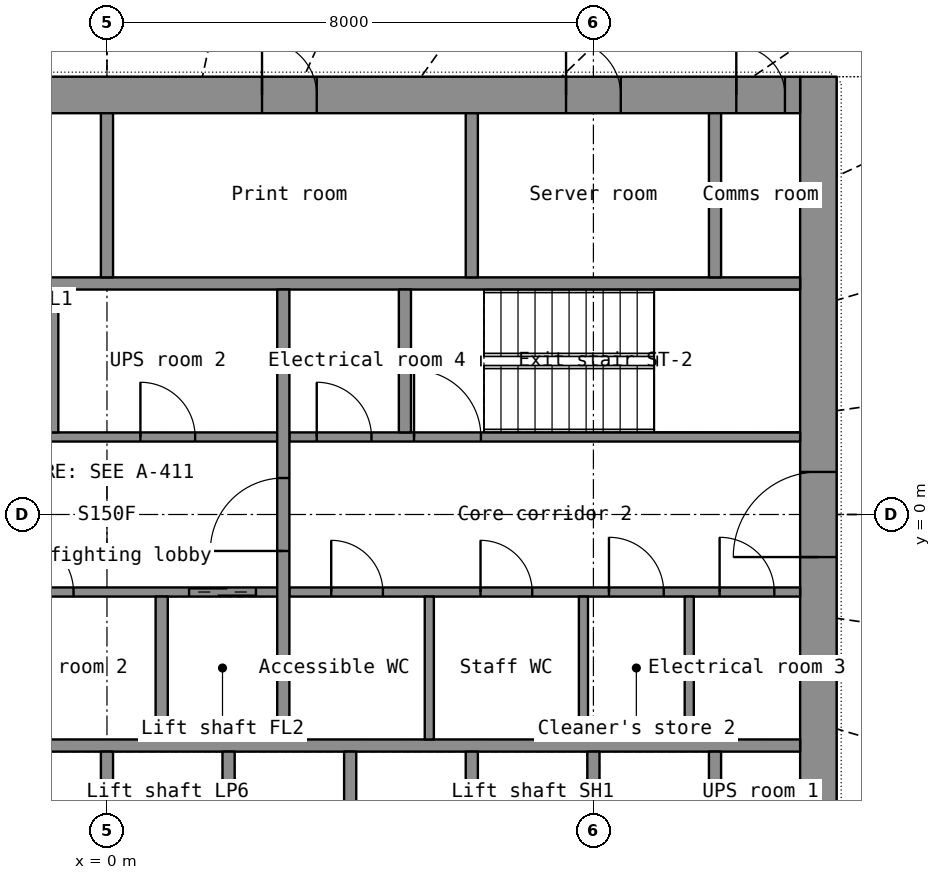
"""IFC4 building model, lengths in metres.
Left out: names, types, materials, properties, quantities, classifications, styles, units other than length and angle.
Written with IfcOpenShell. Run it as: python <this file> out.ifc"""

import sys

from ifc_helpers import new_model, si_unit, direction, frame, frame_2d, origin, place, context, subcontext, project, spatial, rectangle, extrude, element, fill, save


model = new_model("IFC4")
c1 = context("Model", 3, precision=1e-05, world=origin(), true_north=direction((0.0, 1.0)))
c2 = subcontext(c1, "Body", "Model", "MODEL_VIEW")
j1 = project(units=[si_unit("LENGTHUNIT", "METRE"), si_unit("PLANEANGLEUNIT", "RADIAN")], contexts=[c1])
p1 = place(None, origin())
s1 = spatial("IfcSite", under=j1, at=p1, CompositionType="ELEMENT")
p2 = place(p1, origin())
s2 = spatial("IfcBuilding", under=s1, at=p2, CompositionType="ELEMENT")
p3 = place(p2, frame((0.0, 0.0, 77.8)))
s3 = spatial("IfcBuildingStorey", under=s2, at=p3, CompositionType="ELEMENT", Elevation=77.8)
p4 = place(p3, frame((11.7, -7.2, 0.0), z_axis=(0.0, 0.0, 1.0), x_axis=(0.0, 1.0, 0.0)))
e1 = element("IfcWall", 1, at=p4, inside=s3, PredefinedType="SHEAR", context=c2, shape_type="SweptSolid", body=[
    extrude(rectangle(XDim=14.4, YDim=0.6, at=frame_2d((7.2, 0.0))), origin(), (0.0, 0.0, 1.0), 3.3),
])
p5 = place(p4, frame((6.5, 0.0, 0.0)))
e2 = element("IfcOpeningElement", 2, at=p5, cuts=e1, PredefinedType="OPENING", context=c2, shape_type="SweptSolid", body=[
    extrude(rectangle(XDim=1.4, YDim=2.2, at=frame_2d((0.7, 1.1))), frame((0.0, 0.31, 0.0), z_axis=(0.0, -1.0, 0.0), x_axis=(1.0, 0.0, 0.0)), (0.0, 0.0, 1.0), 0.62),
])
p6 = place(p3, frame((-11.4, 6.9, 0.0), z_axis=(0.0, 0.0, 1.0), x_axis=(1.0, 0.0, 0.0)))
e3 = element("IfcWall", 3, at=p6, inside=s3, PredefinedType="SHEAR", context=c2, shape_type="SweptSolid", body=[
    extrude(rectangle(XDim=22.8, YDim=0.6, at=frame_2d((11.4, 0.0))), origin(), (0.0, 0.0, 1.0), 3.3),
])
p7 = place(p6, frame((1.85, 0.0, 0.0)))
e4 = element("IfcOpeningElement", 4, at=p7, cuts=e3, PredefinedType="OPENING", context=c2, shape_type="SweptSolid", body=[
    extrude(rectangle(XDim=1.1, YDim=2.2, at=frame_2d((0.55, 1.1))), frame((0.0, 0.31, 0.0), z_axis=(0.0, -1.0, 0.0), x_axis=(1.0, 0.0, 0.0)), (0.0, 0.0, 1.0), 0.62),
])
p8 = place(p6, frame((7.95, 0.0, 0.0)))
e5 = element("IfcOpeningElement", 5, at=p8, cuts=e3, PredefinedType="OPENING", context=c2, shape_type="SweptSolid", body=[
    extrude(rectangle(XDim=0.9, YDim=2.1, at=frame_2d((0.45, 1.05))), frame((0.0, 0.31, 0.0), z_axis=(0.0, -1.0, 0.0), x_axis=(1.0, 0.0, 0.0)), (0.0, 0.0, 1.0), 0.62),
])
p9 = place(p6, frame((13.95, 0.0, 0.0)))
e6 = element("IfcOpeningElement", 6, at=p9, cuts=e3, PredefinedType="OPENING", context=c2, shape_type="SweptSolid", body=[
    extrude(rectangle(XDim=0.9, YDim=2.1, at=frame_2d((0.45, 1.05))), frame((0.0, 0.31, 0.0), z_axis=(0.0, -1.0, 0.0), x_axis=(1.0, 0.0, 0.0)), (0.0, 0.0, 1.0), 0.62),
])
p10 = place(p6, frame((18.95, 0.0, 0.0)))
e7 = element("IfcOpeningElement", 7, at=p10, cuts=e3, PredefinedType="OPENING", context=c2, shape_type="SweptSolid", body=[
    extrude(rectangle(XDim=0.9, YDim=2.1, at=frame_2d((0.45, 1.05))), frame((0.0, 0.31, 0.0), z_axis=(0.0, -1.0, 0.0), x_axis=(1.0, 0.0, 0.0)), (0.0, 0.0, 1.0), 0.62),
])
p11 = place(p6, frame((0.25, 0.0, 0.0)))
e8 = element("IfcOpeningElement", 8, at=p11, cuts=e3, PredefinedType="OPENING", context=c2, shape_type="SweptSolid", body=[
    extrude(rectangle(XDim=0.8, YDim=2.05, at=frame_2d((0.4, 1.025))), frame((0.0, 0.31, 0.0), z_axis=(0.0, -1.0, 0.0), x_axis=(1.0, 0.0, 0.0)), (0.0, 0.0, 1.0), 0.62),
])
p12 = place(p6, frame((21.75, 0.0, 0.0)))
e9 = element("IfcOpeningElement", 9, at=p12, cuts=e3, PredefinedType="OPENING", context=c2, shape_type="SweptSolid", body=[
    extrude(rectangle(XDim=0.8, YDim=2.05, at=frame_2d((0.4, 1.025))), frame((0.0, 0.31, 0.0), z_axis=(0.0, -1.0, 0.0), x_axis=(1.0, 0.0, 0.0)), (0.0, 0.0, 1.0), 0.62),
])
for number, where, z_axis, x_axis in (
    (10, (-11.4, -3.8, 0.0), (0.0, 0.0, 1.0), (1.0, 0.0, 0.0)),
    (11, (-11.4, 3.8, 0.0), (0.0, 0.0, 1.0), (1.0, 0.0, 0.0)),
):
    element("IfcWall", number, at=place(p3, frame(where, z_axis=z_axis, x_axis=x_axis)), inside=s3, PredefinedType="SHEAR", context=c2, shape_type="SweptSolid", body=[
        extrude(rectangle(XDim=22.8, YDim=0.2, at=frame_2d((11.4, 0.0))), origin(), (0.0, 0.0, 1.0), 3.3),
    ])
for number, where, z_axis, x_axis in (
    (12, (0.0, -6.6, 0.0), (0.0, 0.0, 1.0), (0.0, 1.0, 0.0)),
    (13, (2.0, -6.6, 0.0), (0.0, 0.0, 1.0), (0.0, 1.0, 0.0)),
    (14, (4.0, -6.6, 0.0), (0.0, 0.0, 1.0), (0.0, 1.0, 0.0)),
    (15, (6.0, -6.6, 0.0), (0.0, 0.0, 1.0), (0.0, 1.0, 0.0)),
    (16, (8.0, -6.6, 0.0), (0.0, 0.0, 1.0), (0.0, 1.0, 0.0)),
    (17, (10.0, -6.6, 0.0), (0.0, 0.0, 1.0), (0.0, 1.0, 0.0)),
    (18, (10.0, 3.9, 0.0), (0.0, 0.0, 1.0), (0.0, 1.0, 0.0)),
):
    element("IfcWall", number, at=place(p3, frame(where, z_axis=z_axis, x_axis=x_axis)), inside=s3, PredefinedType="SHEAR", context=c2, shape_type="SweptSolid", body=[
        extrude(rectangle(XDim=2.7, YDim=0.2, at=frame_2d((1.35, 0.0))), origin(), (0.0, 0.0, 1.0), 3.3),
    ])
for number, where, z_axis, x_axis in (
    (19, (0.0, 3.9, 0.0), (0.0, 0.0, 1.0), (0.0, 1.0, 0.0)),
    (20, (6.0, 3.9, 0.0), (0.0, 0.0, 1.0), (0.0, 1.0, 0.0)),
):
    element("IfcWall", number, at=place(p3, frame(where, z_axis=z_axis, x_axis=x_axis)), inside=s3, PredefinedType="PARTITIONING", context=c2, shape_type="SweptSolid", body=[
        extrude(rectangle(XDim=2.7, YDim=0.2, at=frame_2d((1.35, 0.0))), origin(), (0.0, 0.0, 1.0), 3.3),
    ])
p13 = place(p3, frame((-2.8, -1.275, 0.0), z_axis=(0.0, 0.0, 1.0), x_axis=(1.0, 0.0, 0.0)))
e21 = element("IfcWall", 21, at=p13, inside=s3, PredefinedType="SHEAR", context=c2, shape_type="SweptSolid", body=[
    extrude(rectangle(XDim=5.6, YDim=0.15, at=frame_2d((2.8, 0.0))), origin(), (0.0, 0.0, 1.0), 3.3),
])
p14 = place(p13, frame((4.15, 0.0, 0.0)))
e22 = element("IfcOpeningElement", 22, at=p14, cuts=e21, PredefinedType="OPENING", context=c2, shape_type="SweptSolid", body=[
    extrude(rectangle(XDim=1.1, YDim=2.2, at=frame_2d((0.55, 1.1))), frame((0.0, 0.085, 0.0), z_axis=(0.0, -1.0, 0.0), x_axis=(1.0, 0.0, 0.0)), (0.0, 0.0, 1.0), 0.17),
])
p15 = place(p13, frame((1.35, 0.0, 0.0)))
e23 = element("IfcOpeningElement", 23, at=p15, cuts=e21, PredefinedType="OPENING", context=c2, shape_type="SweptSolid", body=[
    extrude(rectangle(XDim=0.9, YDim=2.1, at=frame_2d((0.45, 1.05))), frame((0.0, 0.085, 0.0), z_axis=(0.0, -1.0, 0.0), x_axis=(1.0, 0.0, 0.0)), (0.0, 0.0, 1.0), 0.17),
])
p16 = place(p3, frame((3.0, -1.275, 0.0), z_axis=(0.0, 0.0, 1.0), x_axis=(1.0, 0.0, 0.0)))
e24 = element("IfcWall", 24, at=p16, inside=s3, PredefinedType="PARTITIONING", context=c2, shape_type="SweptSolid", body=[
    extrude(rectangle(XDim=8.4, YDim=0.15, at=frame_2d((4.2, 0.0))), origin(), (0.0, 0.0, 1.0), 3.3),
])
p17 = place(p16, frame((0.688, 0.0, 0.0)))
e25 = element("IfcOpeningElement", 25, at=p17, cuts=e24, PredefinedType="OPENING", context=c2, shape_type="SweptSolid", body=[
    extrude(rectangle(XDim=0.85, YDim=2.1, at=frame_2d((0.425, 1.05))), frame((0.0, 0.085, 0.0), z_axis=(0.0, -1.0, 0.0), x_axis=(1.0, 0.0, 0.0)), (0.0, 0.0, 1.0), 0.17),
])
p18 = place(p16, frame((3.144, 0.0, 0.0)))
e26 = element("IfcOpeningElement", 26, at=p18, cuts=e24, PredefinedType="OPENING", context=c2, shape_type="SweptSolid", body=[
    extrude(rectangle(XDim=0.85, YDim=2.1, at=frame_2d((0.425, 1.05))), frame((0.0, 0.085, 0.0), z_axis=(0.0, -1.0, 0.0), x_axis=(1.0, 0.0, 0.0)), (0.0, 0.0, 1.0), 0.17),
])
p19 = place(p16, frame((5.256, 0.0, 0.0)))
e27 = element("IfcOpeningElement", 27, at=p19, cuts=e24, PredefinedType="OPENING", context=c2, shape_type="SweptSolid", body=[
    extrude(rectangle(XDim=0.9, YDim=2.1, at=frame_2d((0.45, 1.05))), frame((0.0, 0.085, 0.0), z_axis=(0.0, -1.0, 0.0), x_axis=(1.0, 0.0, 0.0)), (0.0, 0.0, 1.0), 0.17),
])
p20 = place(p16, frame((7.075, 0.0, 0.0)))
e28 = element("IfcOpeningElement", 28, at=p20, cuts=e24, PredefinedType="OPENING", context=c2, shape_type="SweptSolid", body=[
    extrude(rectangle(XDim=0.9, YDim=2.1, at=frame_2d((0.45, 1.05))), frame((0.0, 0.085, 0.0), z_axis=(0.0, -1.0, 0.0), x_axis=(1.0, 0.0, 0.0)), (0.0, 0.0, 1.0), 0.17),
])
p21 = place(p3, frame((-2.8, 1.275, 0.0), z_axis=(0.0, 0.0, 1.0), x_axis=(1.0, 0.0, 0.0)))
e29 = element("IfcWall", 29, at=p21, inside=s3, PredefinedType="SHEAR", context=c2, shape_type="SweptSolid", body=[
    extrude(rectangle(XDim=5.6, YDim=0.15, at=frame_2d((2.8, 0.0))), origin(), (0.0, 0.0, 1.0), 3.3),
])
p22 = place(p21, frame((0.35, 0.0, 0.0)))
e30 = element("IfcOpeningElement", 30, at=p22, cuts=e29, PredefinedType="OPENING", context=c2, shape_type="SweptSolid", body=[
    extrude(rectangle(XDim=1.1, YDim=2.2, at=frame_2d((0.55, 1.1))), frame((0.0, 0.085, 0.0), z_axis=(0.0, -1.0, 0.0), x_axis=(1.0, 0.0, 0.0)), (0.0, 0.0, 1.0), 0.17),
])
p23 = place(p21, frame((3.35, 0.0, 0.0)))
e31 = element("IfcOpeningElement", 31, at=p23, cuts=e29, PredefinedType="OPENING", context=c2, shape_type="SweptSolid", body=[
    extrude(rectangle(XDim=0.9, YDim=2.1, at=frame_2d((0.45, 1.05))), frame((0.0, 0.085, 0.0), z_axis=(0.0, -1.0, 0.0), x_axis=(1.0, 0.0, 0.0)), (0.0, 0.0, 1.0), 0.17),
])
p24 = place(p3, frame((3.0, 1.275, 0.0), z_axis=(0.0, 0.0, 1.0), x_axis=(1.0, 0.0, 0.0)))
e32 = element("IfcWall", 32, at=p24, inside=s3, PredefinedType="SHEAR", context=c2, shape_type="SweptSolid", body=[
    extrude(rectangle(XDim=8.4, YDim=0.15, at=frame_2d((4.2, 0.0))), origin(), (0.0, 0.0, 1.0), 3.3),
])
p25 = place(p24, frame((2.05, 0.0, 0.0)))
e33 = element("IfcOpeningElement", 33, at=p25, cuts=e32, PredefinedType="OPENING", context=c2, shape_type="SweptSolid", body=[
    extrude(rectangle(XDim=1.1, YDim=2.15, at=frame_2d((0.55, 1.075))), frame((0.0, 0.085, 0.0), z_axis=(0.0, -1.0, 0.0), x_axis=(1.0, 0.0, 0.0)), (0.0, 0.0, 1.0), 0.17),
])
p26 = place(p24, frame((0.45, 0.0, 0.0)))
e34 = element("IfcOpeningElement", 34, at=p26, cuts=e32, PredefinedType="OPENING", context=c2, shape_type="SweptSolid", body=[
    extrude(rectangle(XDim=0.9, YDim=2.1, at=frame_2d((0.45, 1.05))), frame((0.0, 0.085, 0.0), z_axis=(0.0, -1.0, 0.0), x_axis=(1.0, 0.0, 0.0)), (0.0, 0.0, 1.0), 0.17),
])
p27 = place(p3, frame((2.9, -3.7, 0.0), z_axis=(0.0, 0.0, 1.0), x_axis=(0.0, 1.0, 0.0)))
e35 = element("IfcWall", 35, at=p27, inside=s3, PredefinedType="SHEAR", context=c2, shape_type="SweptSolid", body=[
    extrude(rectangle(XDim=7.4, YDim=0.2, at=frame_2d((3.7, 0.0))), origin(), (0.0, 0.0, 1.0), 3.3),
])
p28 = place(p27, frame((3.1, 0.0, 0.0)))
e36 = element("IfcOpeningElement", 36, at=p28, cuts=e35, PredefinedType="OPENING", context=c2, shape_type="SweptSolid", body=[
    extrude(rectangle(XDim=1.2, YDim=2.2, at=frame_2d((0.6, 1.1))), frame((0.0, 0.11, 0.0), z_axis=(0.0, -1.0, 0.0), x_axis=(1.0, 0.0, 0.0)), (0.0, 0.0, 1.0), 0.22),
])
for number, where, z_axis, x_axis in (
    (37, (-0.9, 1.35, 0.0), (0.0, 0.0, 1.0), (0.0, 1.0, 0.0)),
    (38, (0.9, -3.7, 0.0), (0.0, 0.0, 1.0), (0.0, 1.0, 0.0)),
    (39, (4.9, 1.35, 0.0), (0.0, 0.0, 1.0), (0.0, 1.0, 0.0)),
):
    element("IfcWall", number, at=place(p3, frame(where, z_axis=z_axis, x_axis=x_axis)), inside=s3, PredefinedType="SHEAR", context=c2, shape_type="SweptSolid", body=[
        extrude(rectangle(XDim=2.35, YDim=0.2, at=frame_2d((1.175, 0.0))), origin(), (0.0, 0.0, 1.0), 3.3),
    ])
for number, where, z_axis, x_axis in (
    (40, (5.301, -3.7, 0.0), (0.0, 0.0, 1.0), (0.0, 1.0, 0.0)),
    (41, (7.836, -3.7, 0.0), (0.0, 0.0, 1.0), (0.0, 1.0, 0.0)),
    (42, (9.576, -3.7, 0.0), (0.0, 0.0, 1.0), (0.0, 1.0, 0.0)),
):
    element("IfcWall", number, at=place(p3, frame(where, z_axis=z_axis, x_axis=x_axis)), inside=s3, PredefinedType="PARTITIONING", context=c2, shape_type="SweptSolid", body=[
        extrude(rectangle(XDim=2.35, YDim=0.15, at=frame_2d((1.175, 0.0))), origin(), (0.0, 0.0, 1.0), 3.3),
    ])
p29 = place(p9, origin())
e43 = element("IfcDoor", 43, at=p29, inside=s3, OperationType="SINGLE_SWING_LEFT", PredefinedType="DOOR", context=c2, shape_type="SweptSolid", body=[
    extrude(rectangle(XDim=0.9, YDim=2.1, at=frame_2d((0.45, 1.05))), frame((0.0, 0.025, 0.0), z_axis=(0.0, -1.0, 0.0), x_axis=(1.0, 0.0, 0.0)), (0.0, 0.0, 1.0), 0.05),
])
fill(e6, e43)
p30 = place(p10, origin())
e44 = element("IfcDoor", 44, at=p30, inside=s3, OperationType="SINGLE_SWING_LEFT", PredefinedType="DOOR", context=c2, shape_type="SweptSolid", body=[
    extrude(rectangle(XDim=0.9, YDim=2.1, at=frame_2d((0.45, 1.05))), frame((0.0, 0.025, 0.0), z_axis=(0.0, -1.0, 0.0), x_axis=(1.0, 0.0, 0.0)), (0.0, 0.0, 1.0), 0.05),
])
fill(e7, e44)
p31 = place(p12, origin())
e45 = element("IfcDoor", 45, at=p31, inside=s3, OperationType="SINGLE_SWING_LEFT", PredefinedType="DOOR", context=c2, shape_type="SweptSolid", body=[
    extrude(rectangle(XDim=0.8, YDim=2.05, at=frame_2d((0.4, 1.025))), frame((0.0, 0.025, 0.0), z_axis=(0.0, -1.0, 0.0), x_axis=(1.0, 0.0, 0.0)), (0.0, 0.0, 1.0), 0.05),
])
fill(e9, e45)
p32 = place(p5, origin())
e46 = element("IfcDoor", 46, at=p32, inside=s3, OperationType="DOUBLE_DOOR_SINGLE_SWING", PredefinedType="DOOR", context=c2, shape_type="SweptSolid", body=[
    extrude(rectangle(XDim=1.4, YDim=2.2, at=frame_2d((0.7, 1.1))), frame((0.0, 0.025, 0.0), z_axis=(0.0, -1.0, 0.0), x_axis=(1.0, 0.0, 0.0)), (0.0, 0.0, 1.0), 0.05),
])
fill(e2, e46)
p33 = place(p28, origin())
e47 = element("IfcDoor", 47, at=p33, inside=s3, OperationType="SINGLE_SWING_LEFT", PredefinedType="DOOR", context=c2, shape_type="SweptSolid", body=[
    extrude(rectangle(XDim=1.2, YDim=2.2, at=frame_2d((0.6, 1.1))), frame((0.0, 0.025, 0.0), z_axis=(0.0, -1.0, 0.0), x_axis=(1.0, 0.0, 0.0)), (0.0, 0.0, 1.0), 0.05),
])
fill(e36, e47)
p34 = place(p14, origin())
e48 = element("IfcDoor", 48, at=p34, inside=s3, OperationType="DOUBLE_DOOR_SLIDING", PredefinedType="DOOR", context=c2, shape_type="SweptSolid", body=[
    extrude(rectangle(XDim=1.1, YDim=2.2, at=frame_2d((0.55, 1.1))), frame((0.0, 0.025, 0.0), z_axis=(0.0, -1.0, 0.0), x_axis=(1.0, 0.0, 0.0)), (0.0, 0.0, 1.0), 0.05),
])
fill(e22, e48)
p35 = place(p25, origin())
e49 = element("IfcDoor", 49, at=p35, inside=s3, OperationType="SINGLE_SWING_LEFT", PredefinedType="DOOR", context=c2, shape_type="SweptSolid", body=[
    extrude(rectangle(XDim=1.1, YDim=2.15, at=frame_2d((0.55, 1.075))), frame((0.0, 0.025, 0.0), z_axis=(0.0, -1.0, 0.0), x_axis=(1.0, 0.0, 0.0)), (0.0, 0.0, 1.0), 0.05),
])
fill(e33, e49)
p36 = place(p17, origin())
e50 = element("IfcDoor", 50, at=p36, inside=s3, OperationType="SINGLE_SWING_LEFT", PredefinedType="DOOR", context=c2, shape_type="SweptSolid", body=[
    extrude(rectangle(XDim=0.85, YDim=2.1, at=frame_2d((0.425, 1.05))), frame((0.0, 0.025, 0.0), z_axis=(0.0, -1.0, 0.0), x_axis=(1.0, 0.0, 0.0)), (0.0, 0.0, 1.0), 0.05),
])
fill(e25, e50)
p37 = place(p18, origin())
e51 = element("IfcDoor", 51, at=p37, inside=s3, OperationType="SINGLE_SWING_LEFT", PredefinedType="DOOR", context=c2, shape_type="SweptSolid", body=[
    extrude(rectangle(XDim=0.85, YDim=2.1, at=frame_2d((0.425, 1.05))), frame((0.0, 0.025, 0.0), z_axis=(0.0, -1.0, 0.0), x_axis=(1.0, 0.0, 0.0)), (0.0, 0.0, 1.0), 0.05),
])
fill(e26, e51)
p38 = place(p19, origin())
e52 = element("IfcDoor", 52, at=p38, inside=s3, OperationType="SINGLE_SWING_LEFT", PredefinedType="DOOR", context=c2, shape_type="SweptSolid", body=[
    extrude(rectangle(XDim=0.9, YDim=2.1, at=frame_2d((0.45, 1.05))), frame((0.0, 0.025, 0.0), z_axis=(0.0, -1.0, 0.0), x_axis=(1.0, 0.0, 0.0)), (0.0, 0.0, 1.0), 0.05),
])
fill(e27, e52)
p39 = place(p20, origin())
e53 = element("IfcDoor", 53, at=p39, inside=s3, OperationType="SINGLE_SWING_LEFT", PredefinedType="DOOR", context=c2, shape_type="SweptSolid", body=[
    extrude(rectangle(XDim=0.9, YDim=2.1, at=frame_2d((0.45, 1.05))), frame((0.0, 0.025, 0.0), z_axis=(0.0, -1.0, 0.0), x_axis=(1.0, 0.0, 0.0)), (0.0, 0.0, 1.0), 0.05),
])
fill(e28, e53)
p40 = place(p23, origin())
e54 = element("IfcDoor", 54, at=p40, inside=s3, OperationType="SINGLE_SWING_LEFT", PredefinedType="DOOR", context=c2, shape_type="SweptSolid", body=[
    extrude(rectangle(XDim=0.9, YDim=2.1, at=frame_2d((0.45, 1.05))), frame((0.0, 0.025, 0.0), z_axis=(0.0, -1.0, 0.0), x_axis=(1.0, 0.0, 0.0)), (0.0, 0.0, 1.0), 0.05),
])
fill(e31, e54)
p41 = place(p15, origin())
e55 = element("IfcDoor", 55, at=p41, inside=s3, OperationType="SINGLE_SWING_LEFT", PredefinedType="DOOR", context=c2, shape_type="SweptSolid", body=[
    extrude(rectangle(XDim=0.9, YDim=2.1, at=frame_2d((0.45, 1.05))), frame((0.0, 0.025, 0.0), z_axis=(0.0, -1.0, 0.0), x_axis=(1.0, 0.0, 0.0)), (0.0, 0.0, 1.0), 0.05),
])
fill(e23, e55)
p42 = place(p26, origin())
e56 = element("IfcDoor", 56, at=p42, inside=s3, OperationType="SINGLE_SWING_LEFT", PredefinedType="DOOR", context=c2, shape_type="SweptSolid", body=[
    extrude(rectangle(XDim=0.9, YDim=2.1, at=frame_2d((0.45, 1.05))), frame((0.0, 0.025, 0.0), z_axis=(0.0, -1.0, 0.0), x_axis=(1.0, 0.0, 0.0)), (0.0, 0.0, 1.0), 0.05),
])
fill(e34, e56)
save(model, sys.argv[1])
